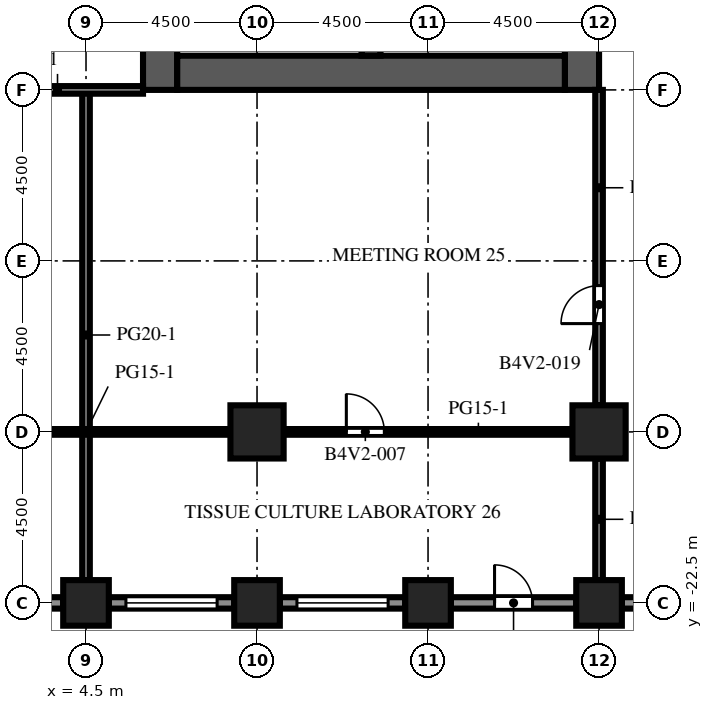
"""IFC4 building model, lengths in metres.
Left out: names, types, materials, properties, quantities, classifications, styles, units other than length and angle.
Written with IfcOpenShell. Run it as: python <this file> out.ifc"""

import sys

from ifc_helpers import new_model, si_unit, direction, frame, frame_2d, origin, origin_2d, place, context, subcontext, project, spatial, rectangle, extrude, element, fill, save


model = new_model("IFC4")
c1 = context("Model", 3, precision=1e-05, world=origin(), true_north=direction((0.0, 1.0)))
c2 = subcontext(c1, "Body", "Model", "MODEL_VIEW")
j1 = project(units=[si_unit("LENGTHUNIT", "METRE"), si_unit("PLANEANGLEUNIT", "RADIAN")], contexts=[c1])
p1 = place(None, origin())
s1 = spatial("IfcSite", under=j1, at=p1, CompositionType="ELEMENT")
p2 = place(p1, origin())
s2 = spatial("IfcBuilding", under=s1, at=p2, CompositionType="ELEMENT")
p3 = place(p2, frame((0.0, 0.0, 137.2)))
s3 = spatial("IfcBuildingStorey", under=s2, at=p3, CompositionType="ELEMENT", Elevation=137.2)
for number, where, z_axis, x_axis in (
    (1, (4.5, -22.5, 0.0), (0.0, 0.0, 1.0), (1.0, 0.0, 0.0)),
    (2, (9.0, -22.5, 0.0), (0.0, 0.0, 1.0), (1.0, 0.0, 0.0)),
    (3, (13.5, -22.5, 0.0), (0.0, 0.0, 1.0), (1.0, 0.0, 0.0)),
    (4, (18.0, -22.5, 0.0), (0.0, 0.0, 1.0), (1.0, 0.0, 0.0)),
):
    element("IfcColumn", number, at=place(p3, frame(where, z_axis=z_axis, x_axis=x_axis)), inside=s3, PredefinedType="COLUMN", context=c2, shape_type="SweptSolid", body=[
        extrude(rectangle(XDim=1.2, YDim=1.2, at=origin_2d()), origin(), (0.0, 0.0, 1.0), 4.1),
    ])
for number, where, z_axis, x_axis in (
    (5, (9.0, -18.0, 0.0), (0.0, 0.0, 1.0), (1.0, 0.0, 0.0)),
    (6, (18.0, -18.0, 0.0), (0.0, 0.0, 1.0), (1.0, 0.0, 0.0)),
):
    element("IfcColumn", number, at=place(p3, frame(where, z_axis=z_axis, x_axis=x_axis)), inside=s3, PredefinedType="COLUMN", context=c2, shape_type="SweptSolid", body=[
        extrude(rectangle(XDim=1.4, YDim=1.4, at=origin_2d()), origin(), (0.0, 0.0, 1.0), 4.1),
    ])
p4 = place(p3, frame((6.45, -9.0, 0.0), z_axis=(0.0, 0.0, 1.0), x_axis=(0.0, 1.0, 0.0)))
e7 = element("IfcWall", 7, at=p4, inside=s3, PredefinedType="SHEAR", context=c2, shape_type="SweptSolid", body=[
    extrude(rectangle(XDim=27.5, YDim=0.9, at=frame_2d((13.75, 0.0))), origin(), (0.0, 0.0, 1.0), 4.1),
])
p5 = place(p4, frame((12.55, 0.0, 0.0)))
e8 = element("IfcOpeningElement", 8, at=p5, cuts=e7, PredefinedType="OPENING", context=c2, shape_type="SweptSolid", body=[
    extrude(rectangle(XDim=2.4, YDim=2.4, at=frame_2d((1.2, 1.2))), frame((0.0, 0.46, 0.0), z_axis=(0.0, -1.0, 0.0), x_axis=(1.0, 0.0, 0.0)), (0.0, 0.0, 1.0), 0.92),
])
p6 = place(p4, frame((5.51, 0.0, 0.0)))
e9 = element("IfcOpeningElement", 9, at=p6, cuts=e7, PredefinedType="OPENING", context=c2, shape_type="SweptSolid", body=[
    extrude(rectangle(XDim=0.923, YDim=2.1, at=frame_2d((0.461, 1.05))), frame((0.0, 0.46, 0.0), z_axis=(0.0, -1.0, 0.0), x_axis=(1.0, 0.0, 0.0)), (0.0, 0.0, 1.0), 0.92),
])
p7 = place(p4, frame((23.427, 0.0, 0.0)))
e10 = element("IfcOpeningElement", 10, at=p7, cuts=e7, PredefinedType="OPENING", context=c2, shape_type="SweptSolid", body=[
    extrude(rectangle(XDim=1.2, YDim=2.1, at=frame_2d((0.6, 1.05))), frame((0.0, 0.46, 0.0), z_axis=(0.0, -1.0, 0.0), x_axis=(1.0, 0.0, 0.0)), (0.0, 0.0, 1.0), 0.92),
])
p8 = place(p3, frame((17.55, -9.0, 0.0), z_axis=(0.0, 0.0, 1.0), x_axis=(0.0, 1.0, 0.0)))
e11 = element("IfcWall", 11, at=p8, inside=s3, PredefinedType="SHEAR", context=c2, shape_type="SweptSolid", body=[
    extrude(rectangle(XDim=27.5, YDim=0.9, at=frame_2d((13.75, 0.0))), origin(), (0.0, 0.0, 1.0), 4.1),
])
p9 = place(p8, frame((12.55, 0.0, 0.0)))
e12 = element("IfcOpeningElement", 12, at=p9, cuts=e11, PredefinedType="OPENING", context=c2, shape_type="SweptSolid", body=[
    extrude(rectangle(XDim=2.4, YDim=2.4, at=frame_2d((1.2, 1.2))), frame((0.0, 0.46, 0.0), z_axis=(0.0, -1.0, 0.0), x_axis=(1.0, 0.0, 0.0)), (0.0, 0.0, 1.0), 0.92),
])
p10 = place(p8, frame((6.825, 0.0, 0.0)))
e13 = element("IfcOpeningElement", 13, at=p10, cuts=e11, PredefinedType="OPENING", context=c2, shape_type="SweptSolid", body=[
    extrude(rectangle(XDim=1.2, YDim=2.1, at=frame_2d((0.6, 1.05))), frame((0.0, 0.46, 0.0), z_axis=(0.0, -1.0, 0.0), x_axis=(1.0, 0.0, 0.0)), (0.0, 0.0, 1.0), 0.92),
])
p11 = place(p8, frame((19.475, 0.0, 0.0)))
e14 = element("IfcOpeningElement", 14, at=p11, cuts=e11, PredefinedType="OPENING", context=c2, shape_type="SweptSolid", body=[
    extrude(rectangle(XDim=1.2, YDim=2.1, at=frame_2d((0.6, 1.05))), frame((0.0, 0.46, 0.0), z_axis=(0.0, -1.0, 0.0), x_axis=(1.0, 0.0, 0.0)), (0.0, 0.0, 1.0), 0.92),
])
p12 = place(p3, frame((6.9, -8.55, 0.0), z_axis=(0.0, 0.0, 1.0), x_axis=(1.0, 0.0, 0.0)))
e15 = element("IfcWall", 15, at=p12, inside=s3, PredefinedType="SHEAR", context=c2, shape_type="SweptSolid", body=[
    extrude(rectangle(XDim=10.2, YDim=0.9, at=frame_2d((5.1, 0.0))), origin(), (0.0, 0.0, 1.0), 4.1),
])
p13 = place(p3, frame((12.0, -8.1, 0.0), z_axis=(0.0, 0.0, 1.0), x_axis=(0.0, 1.0, 0.0)))
e16 = element("IfcWall", 16, at=p13, inside=s3, PredefinedType="SHEAR", context=c2, shape_type="SweptSolid", body=[
    extrude(rectangle(XDim=7.35, YDim=0.5, at=frame_2d((3.675, 0.0))), origin(), (0.0, 0.0, 1.0), 4.1),
])
p14 = place(p3, frame((3.9, -22.5, 0.0), z_axis=(0.0, 0.0, 1.0), x_axis=(-1.0, 0.0, 0.0)))
e17 = element("IfcWall", 17, at=p14, inside=s3, PredefinedType="SOLIDWALL", context=c2, shape_type="SweptSolid", body=[
    extrude(rectangle(XDim=3.3, YDim=0.3, at=frame_2d((1.65, 0.0))), origin(), (0.0, 0.0, 1.0), 2.75),
])
p15 = place(p14, frame((0.45, 0.0, 0.8)))
e18 = element("IfcOpeningElement", 18, at=p15, cuts=e17, PredefinedType="OPENING", context=c2, shape_type="SweptSolid", body=[
    extrude(rectangle(XDim=2.4, YDim=1.7, at=frame_2d((1.2, 0.85))), frame((0.0, 0.16, 0.0), z_axis=(0.0, -1.0, 0.0), x_axis=(1.0, 0.0, 0.0)), (0.0, 0.0, 1.0), 0.32),
])
p16 = place(p3, frame((8.4, -22.5, 0.0), z_axis=(0.0, 0.0, 1.0), x_axis=(-1.0, 0.0, 0.0)))
e19 = element("IfcWall", 19, at=p16, inside=s3, PredefinedType="SOLIDWALL", context=c2, shape_type="SweptSolid", body=[
    extrude(rectangle(XDim=3.3, YDim=0.3, at=frame_2d((1.65, 0.0))), origin(), (0.0, 0.0, 1.0), 2.75),
])
p17 = place(p16, frame((0.45, 0.0, 0.8)))
e20 = element("IfcOpeningElement", 20, at=p17, cuts=e19, PredefinedType="OPENING", context=c2, shape_type="SweptSolid", body=[
    extrude(rectangle(XDim=2.4, YDim=1.7, at=frame_2d((1.2, 0.85))), frame((0.0, 0.16, 0.0), z_axis=(0.0, -1.0, 0.0), x_axis=(1.0, 0.0, 0.0)), (0.0, 0.0, 1.0), 0.32),
])
p18 = place(p3, frame((12.9, -22.5, 0.0), z_axis=(0.0, 0.0, 1.0), x_axis=(-1.0, 0.0, 0.0)))
e21 = element("IfcWall", 21, at=p18, inside=s3, PredefinedType="SOLIDWALL", context=c2, shape_type="SweptSolid", body=[
    extrude(rectangle(XDim=3.3, YDim=0.3, at=frame_2d((1.65, 0.0))), origin(), (0.0, 0.0, 1.0), 2.75),
])
p19 = place(p18, frame((0.45, 0.0, 0.8)))
e22 = element("IfcOpeningElement", 22, at=p19, cuts=e21, PredefinedType="OPENING", context=c2, shape_type="SweptSolid", body=[
    extrude(rectangle(XDim=2.4, YDim=1.7, at=frame_2d((1.2, 0.85))), frame((0.0, 0.16, 0.0), z_axis=(0.0, -1.0, 0.0), x_axis=(1.0, 0.0, 0.0)), (0.0, 0.0, 1.0), 0.32),
])
p20 = place(p3, frame((17.4, -22.5, 0.0), z_axis=(0.0, 0.0, 1.0), x_axis=(-1.0, 0.0, 0.0)))
e23 = element("IfcWall", 23, at=p20, inside=s3, PredefinedType="SOLIDWALL", context=c2, shape_type="SweptSolid", body=[
    extrude(rectangle(XDim=3.3, YDim=0.3, at=frame_2d((1.65, 0.0))), origin(), (0.0, 0.0, 1.0), 2.75),
])
p21 = place(p20, frame((1.15, 0.0, 0.0)))
e24 = element("IfcOpeningElement", 24, at=p21, cuts=e23, PredefinedType="OPENING", context=c2, shape_type="SweptSolid", body=[
    extrude(rectangle(XDim=1.0, YDim=2.2, at=frame_2d((0.5, 1.1))), frame((0.0, 0.16, 0.0), z_axis=(0.0, -1.0, 0.0), x_axis=(1.0, 0.0, 0.0)), (0.0, 0.0, 1.0), 0.32),
])
p22 = place(p3, frame((21.9, -22.5, 0.0), z_axis=(0.0, 0.0, 1.0), x_axis=(-1.0, 0.0, 0.0)))
e25 = element("IfcWall", 25, at=p22, inside=s3, PredefinedType="SOLIDWALL", context=c2, shape_type="SweptSolid", body=[
    extrude(rectangle(XDim=3.3, YDim=0.3, at=frame_2d((1.65, 0.0))), origin(), (0.0, 0.0, 1.0), 2.75),
])
p23 = place(p22, frame((1.575, 0.0, 0.8)))
e26 = element("IfcOpeningElement", 26, at=p23, cuts=e25, PredefinedType="OPENING", context=c2, shape_type="SweptSolid", body=[
    extrude(rectangle(XDim=1.2, YDim=1.7, at=frame_2d((0.6, 0.85))), frame((0.0, 0.16, 0.0), z_axis=(0.0, -1.0, 0.0), x_axis=(1.0, 0.0, 0.0)), (0.0, 0.0, 1.0), 0.32),
])
p24 = place(p3, frame((9.325, -8.1, 0.0), z_axis=(0.0, 0.0, 1.0), x_axis=(0.0, 1.0, 0.0)))
e27 = element("IfcWall", 27, at=p24, inside=s3, PredefinedType="PARTITIONING", context=c2, shape_type="SweptSolid", body=[
    extrude(rectangle(XDim=4.41, YDim=0.1, at=frame_2d((2.205, 0.0))), origin(), (0.0, 0.0, 1.0), 3.65),
])
p25 = place(p3, frame((4.5, -21.9, 0.0), z_axis=(0.0, 0.0, 1.0), x_axis=(0.0, 1.0, 0.0)))
e28 = element("IfcWall", 28, at=p25, inside=s3, PredefinedType="PARTITIONING", context=c2, shape_type="SweptSolid", body=[
    extrude(rectangle(XDim=12.9, YDim=0.2, at=frame_2d((6.45, 0.0))), origin(), (0.0, 0.0, 1.0), 3.65),
])
p26 = place(p3, frame((18.0, -21.9, 0.0), z_axis=(0.0, 0.0, 1.0), x_axis=(0.0, 1.0, 0.0)))
e29 = element("IfcWall", 29, at=p26, inside=s3, PredefinedType="PARTITIONING", context=c2, shape_type="SweptSolid", body=[
    extrude(rectangle(XDim=3.2, YDim=0.2, at=frame_2d((1.6, 0.0))), origin(), (0.0, 0.0, 1.0), 3.65),
])
p27 = place(p3, frame((18.0, -17.3, 0.0), z_axis=(0.0, 0.0, 1.0), x_axis=(0.0, 1.0, 0.0)))
e30 = element("IfcWall", 30, at=p27, inside=s3, PredefinedType="PARTITIONING", context=c2, shape_type="SweptSolid", body=[
    extrude(rectangle(XDim=8.3, YDim=0.2, at=frame_2d((4.15, 0.0))), origin(), (0.0, 0.0, 1.0), 3.65),
])
p28 = place(p27, frame((2.15, 0.0, 0.0)))
e31 = element("IfcOpeningElement", 31, at=p28, cuts=e30, PredefinedType="OPENING", context=c2, shape_type="SweptSolid", body=[
    extrude(rectangle(XDim=1.0, YDim=2.1, at=frame_2d((0.5, 1.05))), frame((0.0, 0.11, 0.0), z_axis=(0.0, -1.0, 0.0), x_axis=(1.0, 0.0, 0.0)), (0.0, 0.0, 1.0), 0.22),
])
p29 = place(p3, frame((0.7, -18.0, 0.0), z_axis=(0.0, 0.0, 1.0), x_axis=(1.0, 0.0, 0.0)))
e32 = element("IfcWall", 32, at=p29, inside=s3, PredefinedType="PARTITIONING", context=c2, shape_type="SweptSolid", body=[
    extrude(rectangle(XDim=7.6, YDim=0.15, at=frame_2d((3.8, 0.0))), origin(), (0.0, 0.0, 1.0), 3.65),
])
p30 = place(p3, frame((17.3, -18.0, 0.0), z_axis=(0.0, 0.0, 1.0), x_axis=(-1.0, 0.0, 0.0)))
e33 = element("IfcWall", 33, at=p30, inside=s3, PredefinedType="PARTITIONING", context=c2, shape_type="SweptSolid", body=[
    extrude(rectangle(XDim=7.6, YDim=0.15, at=frame_2d((3.8, 0.0))), origin(), (0.0, 0.0, 1.0), 3.65),
])
p31 = place(p30, frame((4.95, 0.0, 0.0)))
e34 = element("IfcOpeningElement", 34, at=p31, cuts=e33, PredefinedType="OPENING", context=c2, shape_type="SweptSolid", body=[
    extrude(rectangle(XDim=1.0, YDim=2.1, at=frame_2d((0.5, 1.05))), frame((0.0, 0.085, 0.0), z_axis=(0.0, -1.0, 0.0), x_axis=(1.0, 0.0, 0.0)), (0.0, 0.0, 1.0), 0.17),
])
p32 = place(p3, frame((1.5, -9.0, 0.0), z_axis=(0.0, 0.0, 1.0), x_axis=(1.0, 0.0, 0.0)))
e35 = element("IfcWall", 35, at=p32, inside=s3, PredefinedType="PARTITIONING", context=c2, shape_type="SweptSolid", body=[
    extrude(rectangle(XDim=4.5, YDim=0.2, at=frame_2d((2.25, 0.0))), origin(), (0.0, 0.0, 1.0), 3.65),
])
p33 = place(p17, origin())
e36 = element("IfcWindow", 36, at=p33, inside=s3, PartitioningType="SINGLE_PANEL", PredefinedType="WINDOW", context=c2, shape_type="SweptSolid", body=[
    extrude(rectangle(XDim=2.4, YDim=1.7, at=frame_2d((1.2, 0.85))), frame((0.0, 0.03, 0.0), z_axis=(0.0, -1.0, 0.0), x_axis=(1.0, 0.0, 0.0)), (0.0, 0.0, 1.0), 0.06),
])
fill(e20, e36)
p34 = place(p19, origin())
e37 = element("IfcWindow", 37, at=p34, inside=s3, PartitioningType="SINGLE_PANEL", PredefinedType="WINDOW", context=c2, shape_type="SweptSolid", body=[
    extrude(rectangle(XDim=2.4, YDim=1.7, at=frame_2d((1.2, 0.85))), frame((0.0, 0.03, 0.0), z_axis=(0.0, -1.0, 0.0), x_axis=(1.0, 0.0, 0.0)), (0.0, 0.0, 1.0), 0.06),
])
fill(e22, e37)
p35 = place(p21, origin())
e38 = element("IfcDoor", 38, at=p35, inside=s3, OperationType="SINGLE_SWING_RIGHT", PredefinedType="DOOR", context=c2, shape_type="SweptSolid", body=[
    extrude(rectangle(XDim=1.0, YDim=2.2, at=frame_2d((0.5, 1.1))), frame((0.0, 0.025, 0.0), z_axis=(0.0, -1.0, 0.0), x_axis=(1.0, 0.0, 0.0)), (0.0, 0.0, 1.0), 0.05),
])
fill(e24, e38)
p36 = place(p31, origin())
e39 = element("IfcDoor", 39, at=p36, inside=s3, OperationType="SINGLE_SWING_RIGHT", PredefinedType="DOOR", context=c2, shape_type="SweptSolid", body=[
    extrude(rectangle(XDim=1.0, YDim=2.1, at=frame_2d((0.5, 1.05))), frame((0.0, 0.025, 0.0), z_axis=(0.0, -1.0, 0.0), x_axis=(1.0, 0.0, 0.0)), (0.0, 0.0, 1.0), 0.05),
])
fill(e34, e39)
p37 = place(p28, origin())
e40 = element("IfcDoor", 40, at=p37, inside=s3, OperationType="SINGLE_SWING_LEFT", PredefinedType="DOOR", context=c2, shape_type="SweptSolid", body=[
    extrude(rectangle(XDim=1.0, YDim=2.1, at=frame_2d((0.5, 1.05))), frame((0.0, 0.025, 0.0), z_axis=(0.0, -1.0, 0.0), x_axis=(1.0, 0.0, 0.0)), (0.0, 0.0, 1.0), 0.05),
])
fill(e31, e40)
save(model, sys.argv[1])
